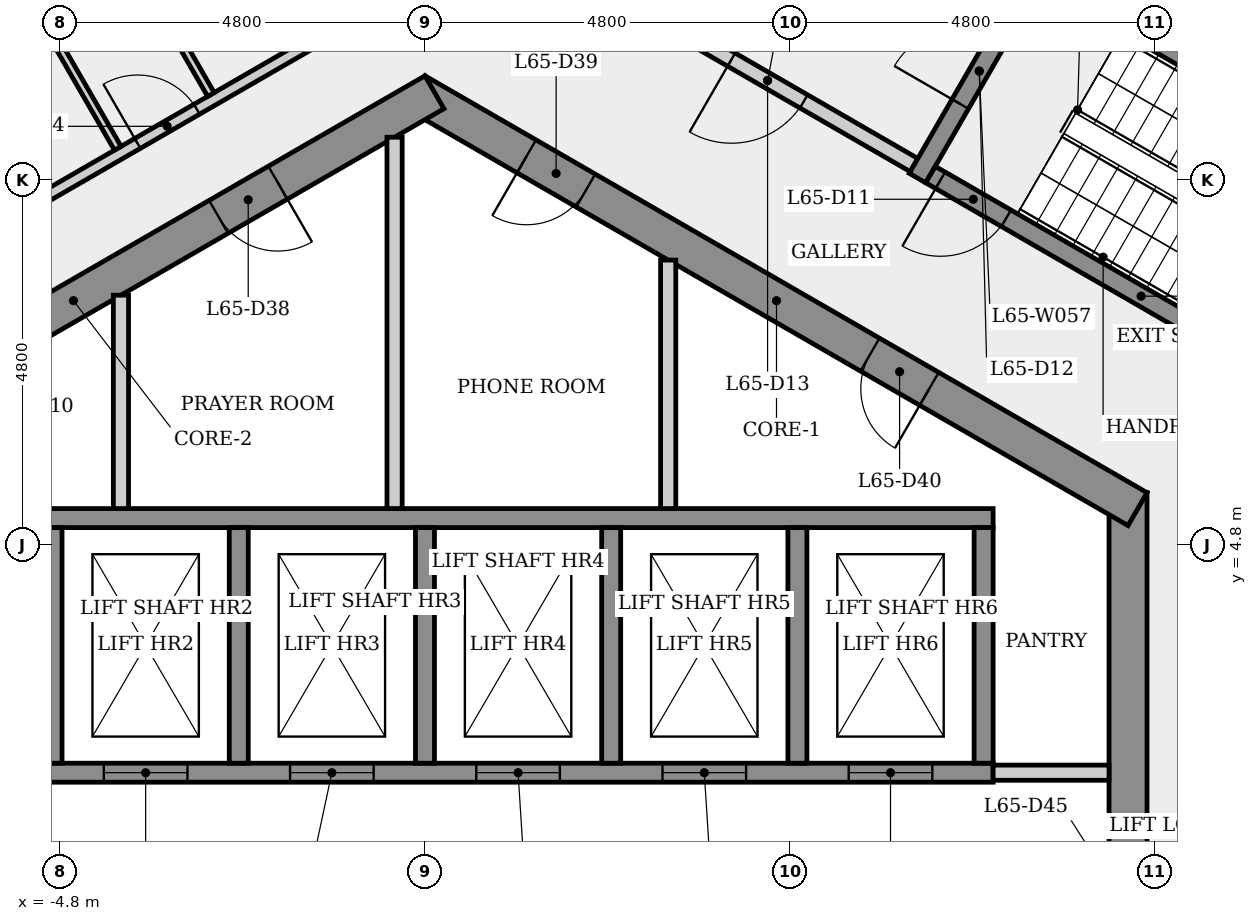
"""IFC4 building model, lengths in metres.
Left out: names, types, materials, properties, quantities, classifications, styles, units other than length and angle.
Written with IfcOpenShell. Run it as: python <this file> out.ifc"""

import sys

from ifc_helpers import new_model, si_unit, direction, frame, frame_2d, origin, place, context, subcontext, project, spatial, rectangle, extrude, element, fill, save


model = new_model("IFC4")
c1 = context("Model", 3, precision=1e-05, world=origin(), true_north=direction((0.0, 1.0)))
c2 = subcontext(c1, "Body", "Model", "MODEL_VIEW")
j1 = project(units=[si_unit("LENGTHUNIT", "METRE"), si_unit("PLANEANGLEUNIT", "RADIAN")], contexts=[c1])
p1 = place(None, origin())
s1 = spatial("IfcSite", under=j1, at=p1, CompositionType="ELEMENT")
p2 = place(p1, origin())
s2 = spatial("IfcBuilding", under=s1, at=p2, CompositionType="ELEMENT")
p3 = place(p2, frame((0.0, 0.0, 242.7)))
s3 = spatial("IfcBuildingStorey", under=s2, at=p3, CompositionType="ELEMENT", Elevation=242.7)
p4 = place(p3, frame((9.25, -5.485, 0.0), z_axis=(0.0, 0.0, 1.0), x_axis=(0.0, 1.0, 0.0)))
e1 = element("IfcWall", 1, at=p4, inside=s3, PredefinedType="SHEAR", context=c2, shape_type="SweptSolid", body=[
    extrude(rectangle(XDim=10.97, YDim=0.5, at=frame_2d((5.485, 0.0))), origin(), (0.0, 0.0, 1.0), 3.4),
])
p5 = place(p4, frame((4.685, 0.0, 0.0)))
e2 = element("IfcOpeningElement", 2, at=p5, cuts=e1, PredefinedType="OPENING", context=c2, shape_type="SweptSolid", body=[
    extrude(rectangle(XDim=1.6, YDim=2.1, at=frame_2d((0.8, 1.05))), frame((0.0, 0.26, 0.0), z_axis=(0.0, -1.0, 0.0), x_axis=(1.0, 0.0, 0.0)), (0.0, 0.0, 1.0), 0.52),
])
p6 = place(p3, frame((9.375, 5.268, 0.0), z_axis=(0.0, 0.0, 1.0), x_axis=(-0.866023993627, 0.500002442456, 0.0)))
e3 = element("IfcWall", 3, at=p6, inside=s3, PredefinedType="SHEAR", context=c2, shape_type="SweptSolid", body=[
    extrude(rectangle(XDim=10.97, YDim=0.5, at=frame_2d((5.485, 0.0))), origin(), (0.0, 0.0, 1.0), 3.4),
])
p7 = place(p6, frame((8.383, 0.0, 0.0)))
e4 = element("IfcOpeningElement", 4, at=p7, cuts=e3, PredefinedType="OPENING", context=c2, shape_type="SweptSolid", body=[
    extrude(rectangle(XDim=0.9, YDim=2.1, at=frame_2d((0.45, 1.05))), frame((0.0, 0.26, 0.0), z_axis=(0.0, -1.0, 0.0), x_axis=(1.0, 0.0, 0.0)), (0.0, 0.0, 1.0), 0.52),
])
p8 = place(p6, frame((3.165, 0.0, 0.0)))
e5 = element("IfcOpeningElement", 5, at=p8, cuts=e3, PredefinedType="OPENING", context=c2, shape_type="SweptSolid", body=[
    extrude(rectangle(XDim=0.9, YDim=2.1, at=frame_2d((0.45, 1.05))), frame((0.0, 0.26, 0.0), z_axis=(0.0, -1.0, 0.0), x_axis=(1.0, 0.0, 0.0)), (0.0, 0.0, 1.0), 0.52),
])
p9 = place(p3, frame((0.125, 10.753, 0.0), z_axis=(0.0, 0.0, 1.0), x_axis=(-0.866023993627, -0.500002442456, 0.0)))
e6 = element("IfcWall", 6, at=p9, inside=s3, PredefinedType="SHEAR", context=c2, shape_type="SweptSolid", body=[
    extrude(rectangle(XDim=10.97, YDim=0.5, at=frame_2d((5.485, 0.0))), origin(), (0.0, 0.0, 1.0), 3.4),
])
p10 = place(p9, frame((9.043, 0.0, 0.0)))
e7 = element("IfcOpeningElement", 7, at=p10, cuts=e6, PredefinedType="OPENING", context=c2, shape_type="SweptSolid", body=[
    extrude(rectangle(XDim=0.9, YDim=2.1, at=frame_2d((0.45, 1.05))), frame((0.0, 0.26, 0.0), z_axis=(0.0, -1.0, 0.0), x_axis=(1.0, 0.0, 0.0)), (0.0, 0.0, 1.0), 0.52),
])
p11 = place(p9, frame((2.38, 0.0, 0.0)))
e8 = element("IfcOpeningElement", 8, at=p11, cuts=e6, PredefinedType="OPENING", context=c2, shape_type="SweptSolid", body=[
    extrude(rectangle(XDim=0.9, YDim=2.1, at=frame_2d((0.45, 1.05))), frame((0.0, 0.26, 0.0), z_axis=(0.0, -1.0, 0.0), x_axis=(1.0, 0.0, 0.0)), (0.0, 0.0, 1.0), 0.52),
])
p12 = place(p3, frame((-9.162, 6.973, 0.0), z_axis=(0.0, 0.0, 1.0), x_axis=(0.866025611375, 0.499999640442, 0.0)))
e9 = element("IfcWall", 9, at=p12, inside=s3, PredefinedType="PARTITIONING", context=c2, shape_type="SweptSolid", body=[
    extrude(rectangle(XDim=8.971, YDim=0.15, at=frame_2d((4.486, 0.0))), origin(), (0.0, 0.0, 1.0), 3.05),
])
p13 = place(p12, frame((6.213, 0.0, 0.0)))
e10 = element("IfcOpeningElement", 10, at=p13, cuts=e9, PredefinedType="OPENING", context=c2, shape_type="SweptSolid", body=[
    extrude(rectangle(XDim=0.9, YDim=2.1, at=frame_2d((0.45, 1.05))), frame((0.0, 0.085, 0.0), z_axis=(0.0, -1.0, 0.0), x_axis=(1.0, 0.0, 0.0)), (0.0, 0.0, 1.0), 0.17),
])
p14 = place(p12, frame((2.463, 0.0, 0.0)))
e11 = element("IfcOpeningElement", 11, at=p14, cuts=e9, PredefinedType="OPENING", context=c2, shape_type="SweptSolid", body=[
    extrude(rectangle(XDim=1.0, YDim=2.1, at=frame_2d((0.5, 1.05))), frame((0.0, 0.085, 0.0), z_axis=(0.0, -1.0, 0.0), x_axis=(1.0, 0.0, 0.0)), (0.0, 0.0, 1.0), 0.17),
])
p15 = place(p3, frame((-7.475, 1.8, 0.0), z_axis=(0.0, 0.0, 1.0), x_axis=(1.0, 0.0, 0.0)))
e12 = element("IfcWall", 12, at=p15, inside=s3, PredefinedType="SHEAR", context=c2, shape_type="SweptSolid", body=[
    extrude(rectangle(XDim=14.95, YDim=0.25, at=frame_2d((7.475, 0.0))), origin(), (0.0, 0.0, 1.0), 3.05),
])
p16 = place(p15, frame((0.8, 0.0, 0.0)))
e13 = element("IfcOpeningElement", 13, at=p16, cuts=e12, PredefinedType="OPENING", context=c2, shape_type="SweptSolid", body=[
    extrude(rectangle(XDim=1.1, YDim=2.1, at=frame_2d((0.55, 1.05))), frame((0.0, 0.135, 0.0), z_axis=(0.0, -1.0, 0.0), x_axis=(1.0, 0.0, 0.0)), (0.0, 0.0, 1.0), 0.27),
])
p17 = place(p15, frame((3.25, 0.0, 0.0)))
e14 = element("IfcOpeningElement", 14, at=p17, cuts=e12, PredefinedType="OPENING", context=c2, shape_type="SweptSolid", body=[
    extrude(rectangle(XDim=1.1, YDim=2.1, at=frame_2d((0.55, 1.05))), frame((0.0, 0.135, 0.0), z_axis=(0.0, -1.0, 0.0), x_axis=(1.0, 0.0, 0.0)), (0.0, 0.0, 1.0), 0.27),
])
p18 = place(p15, frame((5.7, 0.0, 0.0)))
e15 = element("IfcOpeningElement", 15, at=p18, cuts=e12, PredefinedType="OPENING", context=c2, shape_type="SweptSolid", body=[
    extrude(rectangle(XDim=1.1, YDim=2.1, at=frame_2d((0.55, 1.05))), frame((0.0, 0.135, 0.0), z_axis=(0.0, -1.0, 0.0), x_axis=(1.0, 0.0, 0.0)), (0.0, 0.0, 1.0), 0.27),
])
p19 = place(p15, frame((8.15, 0.0, 0.0)))
e16 = element("IfcOpeningElement", 16, at=p19, cuts=e12, PredefinedType="OPENING", context=c2, shape_type="SweptSolid", body=[
    extrude(rectangle(XDim=1.1, YDim=2.1, at=frame_2d((0.55, 1.05))), frame((0.0, 0.135, 0.0), z_axis=(0.0, -1.0, 0.0), x_axis=(1.0, 0.0, 0.0)), (0.0, 0.0, 1.0), 0.27),
])
p20 = place(p15, frame((10.6, 0.0, 0.0)))
e17 = element("IfcOpeningElement", 17, at=p20, cuts=e12, PredefinedType="OPENING", context=c2, shape_type="SweptSolid", body=[
    extrude(rectangle(XDim=1.1, YDim=2.1, at=frame_2d((0.55, 1.05))), frame((0.0, 0.135, 0.0), z_axis=(0.0, -1.0, 0.0), x_axis=(1.0, 0.0, 0.0)), (0.0, 0.0, 1.0), 0.27),
])
p21 = place(p15, frame((13.05, 0.0, 0.0)))
e18 = element("IfcOpeningElement", 18, at=p21, cuts=e12, PredefinedType="OPENING", context=c2, shape_type="SweptSolid", body=[
    extrude(rectangle(XDim=1.1, YDim=2.1, at=frame_2d((0.55, 1.05))), frame((0.0, 0.135, 0.0), z_axis=(0.0, -1.0, 0.0), x_axis=(1.0, 0.0, 0.0)), (0.0, 0.0, 1.0), 0.27),
])
p22 = place(p3, frame((-7.225, 5.15, 0.0), z_axis=(0.0, 0.0, 1.0), x_axis=(1.0, 0.0, 0.0)))
e19 = element("IfcWall", 19, at=p22, inside=s3, PredefinedType="SHEAR", context=c2, shape_type="SweptSolid", body=[
    extrude(rectangle(XDim=14.7, YDim=0.25, at=frame_2d((7.35, 0.0))), origin(), (0.0, 0.0, 1.0), 3.05),
])
p23 = place(p3, frame((-4.9, 5.025, 0.0), z_axis=(0.0, 0.0, 1.0), x_axis=(0.0, -1.0, 0.0)))
e20 = element("IfcWall", 20, at=p23, inside=s3, PredefinedType="SHEAR", context=c2, shape_type="SweptSolid", body=[
    extrude(rectangle(XDim=3.1, YDim=0.25, at=frame_2d((1.55, 0.0))), origin(), (0.0, 0.0, 1.0), 3.4),
])
p24 = place(p3, frame((-4.204, 13.127, 0.0), z_axis=(0.0, 0.0, 1.0), x_axis=(0.50000932403, -0.866020020486, 0.0)))
e21 = element("IfcWall", 21, at=p24, inside=s3, PredefinedType="PARTITIONING", context=c2, shape_type="SweptSolid", body=[
    extrude(rectangle(XDim=2.775, YDim=0.1, at=frame_2d((1.387, 0.0))), origin(), (0.0, 0.0, 1.0), 3.05),
])
p25 = place(p24, frame((1.012, 0.0, 0.0)))
e22 = element("IfcOpeningElement", 22, at=p25, cuts=e21, PredefinedType="OPENING", context=c2, shape_type="SweptSolid", body=[
    extrude(rectangle(XDim=0.8, YDim=2.1, at=frame_2d((0.4, 1.05))), frame((0.0, 0.06, 0.0), z_axis=(0.0, -1.0, 0.0), x_axis=(1.0, 0.0, 0.0)), (0.0, 0.0, 1.0), 0.12),
])
p26 = place(p3, frame((-4.042, 10.016, 0.0), z_axis=(0.0, 0.0, 1.0), x_axis=(-0.500027320894, 0.866009629484, 0.0)))
e23 = element("IfcWall", 23, at=p26, inside=s3, PredefinedType="PARTITIONING", context=c2, shape_type="SweptSolid", body=[
    extrude(rectangle(XDim=6.193, YDim=0.1, at=frame_2d((3.096, 0.0))), origin(), (0.0, 0.0, 1.0), 3.05),
])
p27 = place(p3, frame((-4.0, 8.083, 0.0), z_axis=(0.0, 0.0, 1.0), x_axis=(0.0, -1.0, 0.0)))
e24 = element("IfcWall", 24, at=p27, inside=s3, PredefinedType="PARTITIONING", context=c2, shape_type="SweptSolid", body=[
    extrude(rectangle(XDim=2.808, YDim=0.2, at=frame_2d((1.404, 0.0))), origin(), (0.0, 0.0, 1.0), 3.05),
])
p28 = place(p3, frame((-2.45, 5.025, 0.0), z_axis=(0.0, 0.0, 1.0), x_axis=(0.0, -1.0, 0.0)))
e25 = element("IfcWall", 25, at=p28, inside=s3, PredefinedType="SHEAR", context=c2, shape_type="SweptSolid", body=[
    extrude(rectangle(XDim=3.1, YDim=0.25, at=frame_2d((1.55, 0.0))), origin(), (0.0, 0.0, 1.0), 3.4),
])
p29 = place(p3, frame((-0.4, 10.161, 0.0), z_axis=(0.0, 0.0, 1.0), x_axis=(0.0, -1.0, 0.0)))
e26 = element("IfcWall", 26, at=p29, inside=s3, PredefinedType="PARTITIONING", context=c2, shape_type="SweptSolid", body=[
    extrude(rectangle(XDim=4.886, YDim=0.2, at=frame_2d((2.443, 0.0))), origin(), (0.0, 0.0, 1.0), 3.05),
])
for number, where, z_axis, x_axis in (
    (27, (0.0, 5.025, 0.0), (0.0, 0.0, 1.0), (0.0, -1.0, 0.0)),
    (28, (2.45, 5.025, 0.0), (0.0, 0.0, 1.0), (0.0, -1.0, 0.0)),
):
    element("IfcWall", number, at=place(p3, frame(where, z_axis=z_axis, x_axis=x_axis)), inside=s3, PredefinedType="SHEAR", context=c2, shape_type="SweptSolid", body=[
        extrude(rectangle(XDim=3.1, YDim=0.25, at=frame_2d((1.55, 0.0))), origin(), (0.0, 0.0, 1.0), 3.4),
    ])
p30 = place(p3, frame((3.2, 8.545, 0.0), z_axis=(0.0, 0.0, 1.0), x_axis=(0.0, -1.0, 0.0)))
e29 = element("IfcWall", 29, at=p30, inside=s3, PredefinedType="PARTITIONING", context=c2, shape_type="SweptSolid", body=[
    extrude(rectangle(XDim=3.27, YDim=0.2, at=frame_2d((1.635, 0.0))), origin(), (0.0, 0.0, 1.0), 3.05),
])
p31 = place(p3, frame((4.9, 5.025, 0.0), z_axis=(0.0, 0.0, 1.0), x_axis=(0.0, -1.0, 0.0)))
e30 = element("IfcWall", 30, at=p31, inside=s3, PredefinedType="SHEAR", context=c2, shape_type="SweptSolid", body=[
    extrude(rectangle(XDim=3.1, YDim=0.25, at=frame_2d((1.55, 0.0))), origin(), (0.0, 0.0, 1.0), 3.4),
])
p32 = place(p3, frame((6.435, 9.795, 0.0), z_axis=(0.0, 0.0, 1.0), x_axis=(-0.866012907634, 0.500021643343, 0.0)))
e31 = element("IfcWall", 31, at=p32, inside=s3, PredefinedType="PARTITIONING", context=c2, shape_type="SweptSolid", body=[
    extrude(rectangle(XDim=4.45, YDim=0.2, at=frame_2d((2.225, 0.0))), origin(), (0.0, 0.0, 1.0), 3.05),
])
p33 = place(p32, frame((1.675, 0.0, 0.0)))
e32 = element("IfcOpeningElement", 32, at=p33, cuts=e31, PredefinedType="OPENING", context=c2, shape_type="SweptSolid", body=[
    extrude(rectangle(XDim=1.1, YDim=2.1, at=frame_2d((0.55, 1.05))), frame((0.0, 0.11, 0.0), z_axis=(0.0, -1.0, 0.0), x_axis=(1.0, 0.0, 0.0)), (0.0, 0.0, 1.0), 0.22),
])
p34 = place(p3, frame((6.48, 9.624, 0.0), z_axis=(0.0, 0.0, 1.0), x_axis=(0.500017246033, 0.866015446554, 0.0)))
e33 = element("IfcWall", 33, at=p34, inside=s3, PredefinedType="SHEAR", context=c2, shape_type="SweptSolid", body=[
    extrude(rectangle(XDim=3.25, YDim=0.25, at=frame_2d((1.625, 0.0))), origin(), (0.0, 0.0, 1.0), 3.05),
])
p35 = place(p34, frame((1.125, 0.0, 0.0)))
e34 = element("IfcOpeningElement", 34, at=p35, cuts=e33, PredefinedType="OPENING", context=c2, shape_type="SweptSolid", body=[
    extrude(rectangle(XDim=1.0, YDim=2.1, at=frame_2d((0.5, 1.05))), frame((0.0, 0.135, 0.0), z_axis=(0.0, -1.0, 0.0), x_axis=(1.0, 0.0, 0.0)), (0.0, 0.0, 1.0), 0.27),
])
p36 = place(p3, frame((7.475, 1.8, 0.0), z_axis=(0.0, 0.0, 1.0), x_axis=(1.0, 0.0, 0.0)))
e35 = element("IfcWall", 35, at=p36, inside=s3, PredefinedType="PARTITIONING", context=c2, shape_type="SweptSolid", body=[
    extrude(rectangle(XDim=1.525, YDim=0.2, at=frame_2d((0.763, 0.0))), origin(), (0.0, 0.0, 1.0), 3.05),
])
p37 = place(p3, frame((7.35, 5.025, 0.0), z_axis=(0.0, 0.0, 1.0), x_axis=(0.0, -1.0, 0.0)))
e36 = element("IfcWall", 36, at=p37, inside=s3, PredefinedType="SHEAR", context=c2, shape_type="SweptSolid", body=[
    extrude(rectangle(XDim=3.1, YDim=0.25, at=frame_2d((1.55, 0.0))), origin(), (0.0, 0.0, 1.0), 3.4),
])
p38 = place(p3, frame((8.151, 12.268, 0.0), z_axis=(0.0, 0.0, 1.0), x_axis=(0.866025499775, -0.499999833739, 0.0)))
e37 = element("IfcWall", 37, at=p38, inside=s3, PredefinedType="SHEAR", context=c2, shape_type="SweptSolid", body=[
    extrude(rectangle(XDim=6.4, YDim=0.25, at=frame_2d((3.2, 0.0))), origin(), (0.0, 0.0, 1.0), 3.05),
])
p39 = place(p3, frame((12.194, 6.47, 0.0), z_axis=(0.0, 0.0, 1.0), x_axis=(-0.866025499775, 0.499999833739, 0.0)))
e38 = element("IfcWall", 38, at=p39, inside=s3, PredefinedType="SHEAR", context=c2, shape_type="SweptSolid", body=[
    extrude(rectangle(XDim=6.4, YDim=0.25, at=frame_2d((3.2, 0.0))), origin(), (0.0, 0.0, 1.0), 3.05),
])
p40 = place(p39, frame((5.25, 0.0, 0.0)))
e39 = element("IfcOpeningElement", 39, at=p40, cuts=e38, PredefinedType="OPENING", context=c2, shape_type="SweptSolid", body=[
    extrude(rectangle(XDim=1.0, YDim=2.1, at=frame_2d((0.5, 1.05))), frame((0.0, 0.135, 0.0), z_axis=(0.0, -1.0, 0.0), x_axis=(1.0, 0.0, 0.0)), (0.0, 0.0, 1.0), 0.27),
])
p41 = place(p17, origin())
e40 = element("IfcDoor", 40, at=p41, inside=s3, OperationType="SLIDING_TO_LEFT", PredefinedType="DOOR", context=c2, shape_type="SweptSolid", body=[
    extrude(rectangle(XDim=1.1, YDim=2.1, at=frame_2d((0.55, 1.05))), frame((0.0, 0.025, 0.0), z_axis=(0.0, -1.0, 0.0), x_axis=(1.0, 0.0, 0.0)), (0.0, 0.0, 1.0), 0.05),
])
fill(e14, e40)
p42 = place(p18, origin())
e41 = element("IfcDoor", 41, at=p42, inside=s3, OperationType="SLIDING_TO_LEFT", PredefinedType="DOOR", context=c2, shape_type="SweptSolid", body=[
    extrude(rectangle(XDim=1.1, YDim=2.1, at=frame_2d((0.55, 1.05))), frame((0.0, 0.025, 0.0), z_axis=(0.0, -1.0, 0.0), x_axis=(1.0, 0.0, 0.0)), (0.0, 0.0, 1.0), 0.05),
])
fill(e15, e41)
p43 = place(p19, origin())
e42 = element("IfcDoor", 42, at=p43, inside=s3, OperationType="SLIDING_TO_LEFT", PredefinedType="DOOR", context=c2, shape_type="SweptSolid", body=[
    extrude(rectangle(XDim=1.1, YDim=2.1, at=frame_2d((0.55, 1.05))), frame((0.0, 0.025, 0.0), z_axis=(0.0, -1.0, 0.0), x_axis=(1.0, 0.0, 0.0)), (0.0, 0.0, 1.0), 0.05),
])
fill(e16, e42)
p44 = place(p20, origin())
e43 = element("IfcDoor", 43, at=p44, inside=s3, OperationType="SLIDING_TO_LEFT", PredefinedType="DOOR", context=c2, shape_type="SweptSolid", body=[
    extrude(rectangle(XDim=1.1, YDim=2.1, at=frame_2d((0.55, 1.05))), frame((0.0, 0.025, 0.0), z_axis=(0.0, -1.0, 0.0), x_axis=(1.0, 0.0, 0.0)), (0.0, 0.0, 1.0), 0.05),
])
fill(e17, e43)
p45 = place(p21, origin())
e44 = element("IfcDoor", 44, at=p45, inside=s3, OperationType="SLIDING_TO_LEFT", PredefinedType="DOOR", context=c2, shape_type="SweptSolid", body=[
    extrude(rectangle(XDim=1.1, YDim=2.1, at=frame_2d((0.55, 1.05))), frame((0.0, 0.025, 0.0), z_axis=(0.0, -1.0, 0.0), x_axis=(1.0, 0.0, 0.0)), (0.0, 0.0, 1.0), 0.05),
])
fill(e18, e44)
p46 = place(p40, origin())
e45 = element("IfcDoor", 45, at=p46, inside=s3, OperationType="SINGLE_SWING_RIGHT", PredefinedType="DOOR", context=c2, shape_type="SweptSolid", body=[
    extrude(rectangle(XDim=1.0, YDim=2.1, at=frame_2d((0.5, 1.05))), frame((0.0, 0.025, 0.0), z_axis=(0.0, -1.0, 0.0), x_axis=(1.0, 0.0, 0.0)), (0.0, 0.0, 1.0), 0.05),
])
fill(e39, e45)
p47 = place(p35, origin())
e46 = element("IfcDoor", 46, at=p47, inside=s3, OperationType="SINGLE_SWING_LEFT", PredefinedType="DOOR", context=c2, shape_type="SweptSolid", body=[
    extrude(rectangle(XDim=1.0, YDim=2.1, at=frame_2d((0.5, 1.05))), frame((0.0, 0.025, 0.0), z_axis=(0.0, -1.0, 0.0), x_axis=(1.0, 0.0, 0.0)), (0.0, 0.0, 1.0), 0.05),
])
fill(e34, e46)
p48 = place(p33, origin())
e47 = element("IfcDoor", 47, at=p48, inside=s3, OperationType="SINGLE_SWING_RIGHT", PredefinedType="DOOR", context=c2, shape_type="SweptSolid", body=[
    extrude(rectangle(XDim=1.1, YDim=2.1, at=frame_2d((0.55, 1.05))), frame((0.0, 0.025, 0.0), z_axis=(0.0, -1.0, 0.0), x_axis=(1.0, 0.0, 0.0)), (0.0, 0.0, 1.0), 0.05),
])
fill(e32, e47)
p49 = place(p13, origin())
e48 = element("IfcDoor", 48, at=p49, inside=s3, OperationType="SINGLE_SWING_LEFT", PredefinedType="DOOR", context=c2, shape_type="SweptSolid", body=[
    extrude(rectangle(XDim=0.9, YDim=2.1, at=frame_2d((0.45, 1.05))), frame((0.0, 0.025, 0.0), z_axis=(0.0, -1.0, 0.0), x_axis=(1.0, 0.0, 0.0)), (0.0, 0.0, 1.0), 0.05),
])
fill(e10, e48)
p50 = place(p11, origin())
e49 = element("IfcDoor", 49, at=p50, inside=s3, OperationType="SINGLE_SWING_LEFT", PredefinedType="DOOR", context=c2, shape_type="SweptSolid", body=[
    extrude(rectangle(XDim=0.9, YDim=2.1, at=frame_2d((0.45, 1.05))), frame((0.0, 0.025, 0.0), z_axis=(0.0, -1.0, 0.0), x_axis=(1.0, 0.0, 0.0)), (0.0, 0.0, 1.0), 0.05),
])
fill(e8, e49)
p51 = place(p7, origin())
e50 = element("IfcDoor", 50, at=p51, inside=s3, OperationType="SINGLE_SWING_RIGHT", PredefinedType="DOOR", context=c2, shape_type="SweptSolid", body=[
    extrude(rectangle(XDim=0.9, YDim=2.1, at=frame_2d((0.45, 1.05))), frame((0.0, 0.025, 0.0), z_axis=(0.0, -1.0, 0.0), x_axis=(1.0, 0.0, 0.0)), (0.0, 0.0, 1.0), 0.05),
])
fill(e4, e50)
p52 = place(p8, origin())
e51 = element("IfcDoor", 51, at=p52, inside=s3, OperationType="SINGLE_SWING_LEFT", PredefinedType="DOOR", context=c2, shape_type="SweptSolid", body=[
    extrude(rectangle(XDim=0.9, YDim=2.1, at=frame_2d((0.45, 1.05))), frame((0.0, 0.025, 0.0), z_axis=(0.0, -1.0, 0.0), x_axis=(1.0, 0.0, 0.0)), (0.0, 0.0, 1.0), 0.05),
])
fill(e5, e51)
save(model, sys.argv[1])
